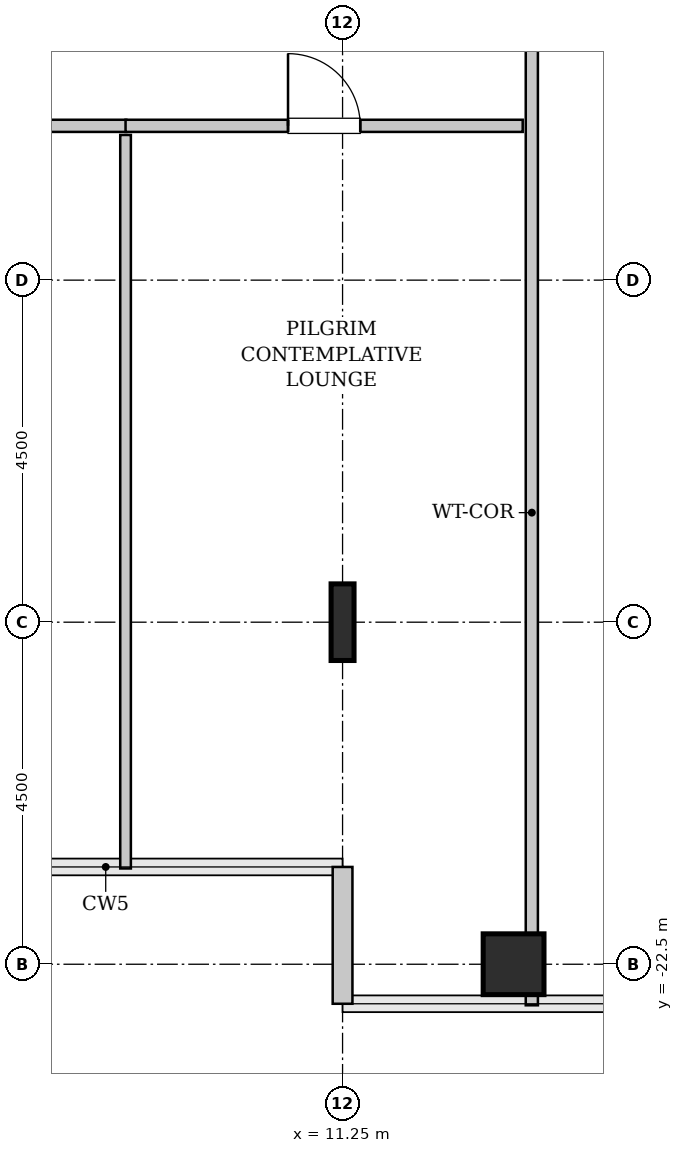
"""IFC4 building model, lengths in metres.
Left out: names, types, materials, properties, quantities, classifications, styles, units other than length and angle.
Written with IfcOpenShell. Run it as: python <this file> out.ifc"""

import sys

from ifc_helpers import new_model, si_unit, direction, frame, frame_2d, origin, origin_2d, place, context, subcontext, project, spatial, rectangle, hollow_rectangle, i_section, extrude, source, transform, mapped, element, fill, save


model = new_model("IFC4")
c1 = context("Model", 3, precision=1e-05, world=origin(), true_north=direction((0.0, 1.0)))
c2 = subcontext(c1, "Body", "Model", "MODEL_VIEW")
j1 = project(units=[si_unit("LENGTHUNIT", "METRE"), si_unit("PLANEANGLEUNIT", "RADIAN")], contexts=[c1])
p1 = place(None, origin())
s1 = spatial("IfcSite", under=j1, at=p1, CompositionType="ELEMENT")
p2 = place(p1, origin())
s2 = spatial("IfcBuilding", under=s1, at=p2, CompositionType="ELEMENT")
p3 = place(p2, frame((0.0, 0.0, 113.6)))
s3 = spatial("IfcBuildingStorey", under=s2, at=p3, CompositionType="ELEMENT", Elevation=113.6)
m1 = source(origin(), c2, "Body", "SweptSolid", [
    extrude(i_section(OverallWidth=0.302, OverallDepth=1.008, WebThickness=0.021, FlangeThickness=0.04, FilletRadius=0.03, at=origin_2d()), origin(), (0.0, 0.0, 1.0), 3.8),
])
p4 = place(p3, frame((11.25, -18.0, 0.0), z_axis=(0.0, 0.0, 1.0), x_axis=(1.0, 0.0, 0.0)))
e1 = element("IfcColumn", 1, at=p4, inside=s3, PredefinedType="COLUMN", context=c2, shape_type="MappedRepresentation", body=[
    mapped(m1, transform((0.0, 0.0, 0.0), x_axis=(1.0, 0.0, 0.0), y_axis=(0.0, 1.0, 0.0), z_axis=(0.0, 0.0, 1.0), scale=1.0)),
])
m2 = source(origin(), c2, "Body", "SweptSolid", [
    extrude(hollow_rectangle(XDim=0.8, YDim=0.8, WallThickness=0.04, InnerFilletRadius=0.04, OuterFilletRadius=0.08, at=origin_2d()), origin(), (0.0, 0.0, 1.0), 3.8),
])
p5 = place(p3, frame((13.5, -22.5, 0.0), z_axis=(0.0, 0.0, 1.0), x_axis=(1.0, 0.0, 0.0)))
e2 = element("IfcColumn", 2, at=p5, inside=s3, PredefinedType="COLUMN", context=c2, shape_type="MappedRepresentation", body=[
    mapped(m2, transform((0.0, 0.0, 0.0), x_axis=(1.0, 0.0, 0.0), y_axis=(0.0, 1.0, 0.0), z_axis=(0.0, 0.0, 1.0), scale=1.0)),
])
m3 = source(origin(), c2, "Body", "SweptSolid", [
    extrude(rectangle(XDim=1.8, YDim=0.26, at=frame_2d((0.9, 0.0))), origin(), (0.0, 0.0, 1.0), 3.55),
])
p6 = place(p3, frame((11.25, -21.22, 0.0), z_axis=(0.0, 0.0, 1.0), x_axis=(0.0, -1.0, 0.0)))
e3 = element("IfcWall", 3, at=p6, inside=s3, PredefinedType="SOLIDWALL", context=c2, shape_type="MappedRepresentation", body=[
    mapped(m3, transform((0.0, 0.0, 0.0), x_axis=(1.0, 0.0, 0.0), y_axis=(0.0, 1.0, 0.0), z_axis=(0.0, 0.0, 1.0), scale=1.0)),
])
m4 = source(origin(), c2, "Body", "SweptSolid", [
    extrude(rectangle(XDim=15.245, YDim=0.16, at=frame_2d((7.623, 0.0))), origin(), (0.0, 0.0, 1.0), 3.535),
])
p7 = place(p3, frame((13.74, -23.04, 0.0), z_axis=(0.0, 0.0, 1.0), x_axis=(0.0, 1.0, 0.0)))
e4 = element("IfcWall", 4, at=p7, inside=s3, PredefinedType="PARTITIONING", context=c2, shape_type="MappedRepresentation", body=[
    mapped(m4, transform((0.0, 0.0, 0.0), x_axis=(1.0, 0.0, 0.0), y_axis=(0.0, 1.0, 0.0), z_axis=(0.0, 0.0, 1.0), scale=1.0)),
])
p8 = place(p7, frame((12.913, 0.0, 0.0)))
e5 = element("IfcOpeningElement", 5, at=p8, cuts=e4, PredefinedType="OPENING", context=c2, shape_type="SweptSolid", body=[
    extrude(rectangle(XDim=0.95, YDim=2.1, at=frame_2d((0.475, 1.05))), frame((0.0, 0.09, 0.0), z_axis=(0.0, -1.0, 0.0), x_axis=(1.0, 0.0, 0.0)), (0.0, 0.0, 1.0), 0.18),
])
m5 = source(origin(), c2, "Body", "SweptSolid", [
    extrude(rectangle(XDim=6.21, YDim=0.16, at=frame_2d((3.105, 0.0))), origin(), (0.0, 0.0, 1.0), 3.535),
])
p9 = place(p3, frame((2.195, -11.47, 0.0), z_axis=(0.0, 0.0, 1.0), x_axis=(1.0, 0.0, 0.0)))
e6 = element("IfcWall", 6, at=p9, inside=s3, PredefinedType="PARTITIONING", context=c2, shape_type="MappedRepresentation", body=[
    mapped(m5, transform((0.0, 0.0, 0.0), x_axis=(1.0, 0.0, 0.0), y_axis=(0.0, 1.0, 0.0), z_axis=(0.0, 0.0, 1.0), scale=1.0)),
])
p10 = place(p9, frame((2.63, 0.0, 0.0)))
e7 = element("IfcOpeningElement", 7, at=p10, cuts=e6, PredefinedType="OPENING", context=c2, shape_type="SweptSolid", body=[
    extrude(rectangle(XDim=0.95, YDim=2.1, at=frame_2d((0.475, 1.05))), frame((0.0, 0.09, 0.0), z_axis=(0.0, -1.0, 0.0), x_axis=(1.0, 0.0, 0.0)), (0.0, 0.0, 1.0), 0.18),
])
m6 = source(origin(), c2, "Body", "SweptSolid", [
    extrude(rectangle(XDim=9.65, YDim=0.14, at=frame_2d((4.825, 0.0))), origin(), (0.0, 0.0, 1.0), 3.535),
])
p11 = place(p3, frame((8.395, -21.24, 0.0), z_axis=(0.0, 0.0, 1.0), x_axis=(0.0, 1.0, 0.0)))
e8 = element("IfcWall", 8, at=p11, inside=s3, PredefinedType="PARTITIONING", context=c2, shape_type="MappedRepresentation", body=[
    mapped(m6, transform((0.0, 0.0, 0.0), x_axis=(1.0, 0.0, 0.0), y_axis=(0.0, 1.0, 0.0), z_axis=(0.0, 0.0, 1.0), scale=1.0)),
])
m7 = source(origin(), c2, "Body", "SweptSolid", [
    extrude(rectangle(XDim=5.225, YDim=0.16, at=frame_2d((2.613, 0.0))), origin(), (0.0, 0.0, 1.0), 3.535),
])
p12 = place(p3, frame((8.395, -11.47, 0.0), z_axis=(0.0, 0.0, 1.0), x_axis=(1.0, 0.0, 0.0)))
e9 = element("IfcWall", 9, at=p12, inside=s3, PredefinedType="PARTITIONING", context=c2, shape_type="MappedRepresentation", body=[
    mapped(m7, transform((0.0, 0.0, 0.0), x_axis=(1.0, 0.0, 0.0), y_axis=(0.0, 1.0, 0.0), z_axis=(0.0, 0.0, 1.0), scale=1.0)),
])
p13 = place(p12, frame((2.137, 0.0, 0.0)))
e10 = element("IfcOpeningElement", 10, at=p13, cuts=e9, PredefinedType="OPENING", context=c2, shape_type="SweptSolid", body=[
    extrude(rectangle(XDim=0.95, YDim=2.1, at=frame_2d((0.475, 1.05))), frame((0.0, 0.09, 0.0), z_axis=(0.0, -1.0, 0.0), x_axis=(1.0, 0.0, 0.0)), (0.0, 0.0, 1.0), 0.18),
])
m8 = source(origin(), c2, "Body", "SweptSolid", [
    extrude(rectangle(XDim=0.95, YDim=2.1, at=frame_2d((0.475, 1.05))), frame((0.0, 0.025, 0.0), z_axis=(0.0, -1.0, 0.0), x_axis=(1.0, 0.0, 0.0)), (0.0, 0.0, 1.0), 0.05),
])
p14 = place(p13, origin())
e11 = element("IfcDoor", 11, at=p14, inside=s3, OperationType="SINGLE_SWING_LEFT", PredefinedType="DOOR", context=c2, shape_type="MappedRepresentation", body=[
    mapped(m8, transform((0.0, 0.0, 0.0), x_axis=(1.0, 0.0, 0.0), y_axis=(0.0, 1.0, 0.0), z_axis=(0.0, 0.0, 1.0), scale=1.0)),
])
fill(e10, e11)
save(model, sys.argv[1])
